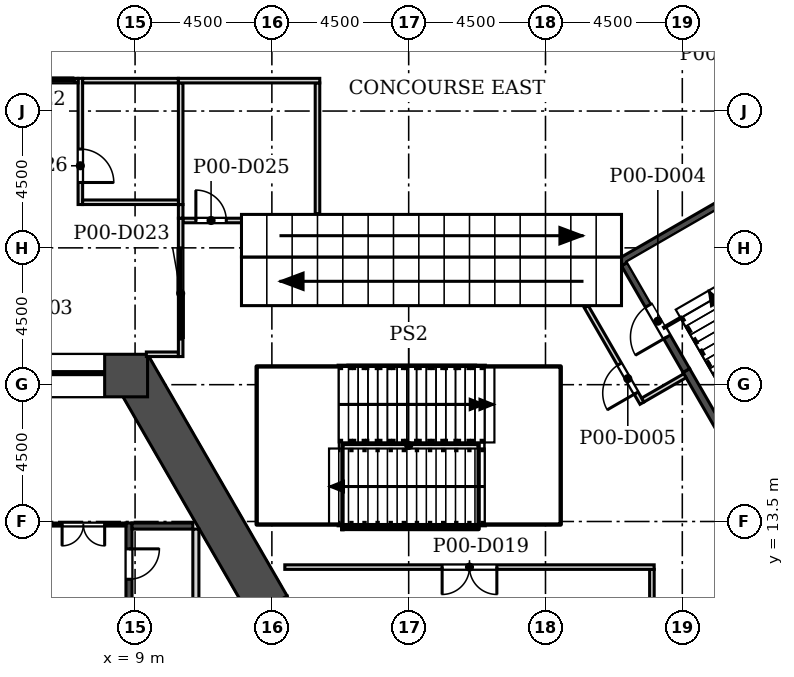
"""IFC4 building model, lengths in metres.
Left out: names, types, materials, properties, quantities, classifications, styles, units other than length and angle.
Written with IfcOpenShell. Run it as: python <this file> out.ifc"""

import sys

from ifc_helpers import new_model, si_unit, direction, frame, frame_2d, origin, place, context, subcontext, project, spatial, rectangle, extrude, element, fill, save


model = new_model("IFC4")
c1 = context("Model", 3, precision=1e-05, world=origin(), true_north=direction((0.0, 1.0)))
c2 = subcontext(c1, "Body", "Model", "MODEL_VIEW")
j1 = project(units=[si_unit("LENGTHUNIT", "METRE"), si_unit("PLANEANGLEUNIT", "RADIAN")], contexts=[c1])
p1 = place(None, origin())
s1 = spatial("IfcSite", under=j1, at=p1, CompositionType="ELEMENT")
p2 = place(p1, origin())
s2 = spatial("IfcBuilding", under=s1, at=p2, CompositionType="ELEMENT")
p3 = place(p2, origin())
s3 = spatial("IfcBuildingStorey", under=s2, at=p3, CompositionType="ELEMENT", Elevation=0.0)
p4 = place(p3, frame((13.3, 0.85, 0.0), z_axis=(0.0, 0.0, 1.0), x_axis=(0.0, 1.0, 0.0)))
e1 = element("IfcWall", 1, at=p4, inside=s3, PredefinedType="SHEAR", context=c2, shape_type="SweptSolid", body=[
    extrude(rectangle(XDim=10.202, YDim=1.4, at=frame_2d((5.101, 0.0))), origin(), (0.0, 0.0, 1.0), 8.0),
])
p5 = place(p4, frame((3.55, 0.0, 0.0)))
e2 = element("IfcOpeningElement", 2, at=p5, cuts=e1, PredefinedType="OPENING", context=c2, shape_type="SweptSolid", body=[
    extrude(rectangle(XDim=1.2, YDim=2.1, at=frame_2d((0.6, 1.05))), frame((0.0, 0.71, 0.0), z_axis=(0.0, -1.0, 0.0), x_axis=(1.0, 0.0, 0.0)), (0.0, 0.0, 1.0), 1.42),
])
p6 = place(p4, frame((7.55, 0.0, 0.0)))
e3 = element("IfcOpeningElement", 3, at=p6, cuts=e1, PredefinedType="OPENING", context=c2, shape_type="SweptSolid", body=[
    extrude(rectangle(XDim=1.2, YDim=2.1, at=frame_2d((0.6, 1.05))), frame((0.0, 0.71, 0.0), z_axis=(0.0, -1.0, 0.0), x_axis=(1.0, 0.0, 0.0)), (0.0, 0.0, 1.0), 1.42),
])
p7 = place(p3, frame((13.394, 10.703, 0.0), z_axis=(0.0, 0.0, 1.0), x_axis=(-0.50000187635, 0.866024320471, 0.0)))
e4 = element("IfcWall", 4, at=p7, inside=s3, PredefinedType="SHEAR", context=c2, shape_type="SweptSolid", body=[
    extrude(rectangle(XDim=9.177, YDim=1.4, at=frame_2d((4.588, 0.0))), origin(), (0.0, 0.0, 1.0), 8.0),
])
p8 = place(p3, frame((9.412, 18.3, 0.0), z_axis=(0.0, 0.0, 1.0), x_axis=(-1.0, 0.0, 0.0)))
e5 = element("IfcWall", 5, at=p8, inside=s3, PredefinedType="SHEAR", context=c2, shape_type="SweptSolid", body=[
    extrude(rectangle(XDim=18.823, YDim=1.4, at=frame_2d((9.412, 0.0))), origin(), (0.0, 0.0, 1.0), 8.0),
])
p9 = place(p8, frame((8.711, 0.0, 0.0)))
e6 = element("IfcOpeningElement", 6, at=p9, cuts=e5, PredefinedType="OPENING", context=c2, shape_type="SweptSolid", body=[
    extrude(rectangle(XDim=1.4, YDim=2.1, at=frame_2d((0.7, 1.05))), frame((0.0, 0.71, 0.0), z_axis=(0.0, -1.0, 0.0), x_axis=(1.0, 0.0, 0.0)), (0.0, 0.0, 1.0), 1.42),
])
p10 = place(p8, frame((11.412, 0.0, 0.0)))
e7 = element("IfcOpeningElement", 7, at=p10, cuts=e5, PredefinedType="OPENING", context=c2, shape_type="SweptSolid", body=[
    extrude(rectangle(XDim=6.0, YDim=2.4, at=frame_2d((3.0, 1.2))), frame((0.0, 0.71, 0.0), z_axis=(0.0, -1.0, 0.0), x_axis=(1.0, 0.0, 0.0)), (0.0, 0.0, 1.0), 1.42),
])
p11 = place(p8, frame((1.412, 0.0, 0.0)))
e8 = element("IfcOpeningElement", 8, at=p11, cuts=e5, PredefinedType="OPENING", context=c2, shape_type="SweptSolid", body=[
    extrude(rectangle(XDim=6.0, YDim=2.4, at=frame_2d((3.0, 1.2))), frame((0.0, 0.71, 0.0), z_axis=(0.0, -1.0, 0.0), x_axis=(1.0, 0.0, 0.0)), (0.0, 0.0, 1.0), 1.42),
])
p12 = place(p3, frame((33.882, 24.114, 0.0), z_axis=(0.0, 0.0, 1.0), x_axis=(-0.500002868947, 0.866023747391, 0.0)))
e9 = element("IfcWall", 9, at=p12, inside=s3, PredefinedType="SOLIDWALL", context=c2, shape_type="SweptSolid", body=[
    extrude(rectangle(XDim=34.115, YDim=0.34, at=frame_2d((17.058, 0.0))), origin(), (0.0, 0.0, 1.0), 7.7),
])
p13 = place(p12, frame((1.115, 0.0, 0.9)))
e10 = element("IfcOpeningElement", 10, at=p13, cuts=e9, PredefinedType="OPENING", context=c2, shape_type="SweptSolid", body=[
    extrude(rectangle(XDim=1.885, YDim=3.5, at=frame_2d((0.942, 1.75))), frame((0.0, 0.18, 0.0), z_axis=(0.0, -1.0, 0.0), x_axis=(1.0, 0.0, 0.0)), (0.0, 0.0, 1.0), 0.36),
])
p14 = place(p12, frame((4.115, 0.0, 0.9)))
e11 = element("IfcOpeningElement", 11, at=p14, cuts=e9, PredefinedType="OPENING", context=c2, shape_type="SweptSolid", body=[
    extrude(rectangle(XDim=1.885, YDim=3.5, at=frame_2d((0.942, 1.75))), frame((0.0, 0.18, 0.0), z_axis=(0.0, -1.0, 0.0), x_axis=(1.0, 0.0, 0.0)), (0.0, 0.0, 1.0), 0.36),
])
p15 = place(p12, frame((22.115, 0.0, 0.9)))
e12 = element("IfcOpeningElement", 12, at=p15, cuts=e9, PredefinedType="OPENING", context=c2, shape_type="SweptSolid", body=[
    extrude(rectangle(XDim=1.885, YDim=3.5, at=frame_2d((0.942, 1.75))), frame((0.0, 0.18, 0.0), z_axis=(0.0, -1.0, 0.0), x_axis=(1.0, 0.0, 0.0)), (0.0, 0.0, 1.0), 0.36),
])
p16 = place(p12, frame((25.115, 0.0, 0.9)))
e13 = element("IfcOpeningElement", 13, at=p16, cuts=e9, PredefinedType="OPENING", context=c2, shape_type="SweptSolid", body=[
    extrude(rectangle(XDim=1.885, YDim=3.5, at=frame_2d((0.942, 1.75))), frame((0.0, 0.18, 0.0), z_axis=(0.0, -1.0, 0.0), x_axis=(1.0, 0.0, 0.0)), (0.0, 0.0, 1.0), 0.36),
])
p17 = place(p12, frame((7.378, 0.0, 0.0)))
e14 = element("IfcOpeningElement", 14, at=p17, cuts=e9, PredefinedType="OPENING", context=c2, shape_type="SweptSolid", body=[
    extrude(rectangle(XDim=2.4, YDim=2.7, at=frame_2d((1.2, 1.35))), frame((0.0, 0.18, 0.0), z_axis=(0.0, -1.0, 0.0), x_axis=(1.0, 0.0, 0.0)), (0.0, 0.0, 1.0), 0.36),
])
p18 = place(p12, frame((18.857, 0.0, 0.0)))
e15 = element("IfcOpeningElement", 15, at=p18, cuts=e9, PredefinedType="OPENING", context=c2, shape_type="SweptSolid", body=[
    extrude(rectangle(XDim=2.4, YDim=2.7, at=frame_2d((1.2, 1.35))), frame((0.0, 0.18, 0.0), z_axis=(0.0, -1.0, 0.0), x_axis=(1.0, 0.0, 0.0)), (0.0, 0.0, 1.0), 0.36),
])
p19 = place(p12, frame((30.336, 0.0, 0.0)))
e16 = element("IfcOpeningElement", 16, at=p19, cuts=e9, PredefinedType="OPENING", context=c2, shape_type="SweptSolid", body=[
    extrude(rectangle(XDim=2.4, YDim=2.7, at=frame_2d((1.2, 1.35))), frame((0.0, 0.18, 0.0), z_axis=(0.0, -1.0, 0.0), x_axis=(1.0, 0.0, 0.0)), (0.0, 0.0, 1.0), 0.36),
])
p20 = place(p12, frame((12.215, 0.0, 0.0)))
e17 = element("IfcOpeningElement", 17, at=p20, cuts=e9, PredefinedType="OPENING", context=c2, shape_type="SweptSolid", body=[
    extrude(rectangle(XDim=4.885, YDim=4.5, at=frame_2d((2.442, 2.25))), frame((0.0, 0.18, 0.0), z_axis=(0.0, -1.0, 0.0), x_axis=(1.0, 0.0, 0.0)), (0.0, 0.0, 1.0), 0.36),
])
p21 = place(p3, frame((11.0, 5.85, 0.0), z_axis=(0.0, 0.0, 1.0), x_axis=(0.0, 1.0, 0.0)))
e18 = element("IfcWall", 18, at=p21, inside=s3, PredefinedType="SOLIDWALL", context=c2, shape_type="SweptSolid", body=[
    extrude(rectangle(XDim=7.4, YDim=0.2, at=frame_2d((3.7, 0.0))), origin(), (0.0, 0.0, 1.0), 7.7),
])
p22 = place(p3, frame((8.8, 8.25, -0.4), z_axis=(0.0, 0.0, 1.0), x_axis=(0.0, 1.0, 0.0)))
e19 = element("IfcWall", 19, at=p22, inside=s3, PredefinedType="SOLIDWALL", context=c2, shape_type="SweptSolid", body=[
    extrude(rectangle(XDim=5.2, YDim=0.2, at=frame_2d((2.6, 0.0))), origin(), (0.0, 0.0, 1.0), 8.1),
])
p23 = place(p22, frame((0.85, 0.0, 0.4)))
e20 = element("IfcOpeningElement", 20, at=p23, cuts=e19, PredefinedType="OPENING", context=c2, shape_type="SweptSolid", body=[
    extrude(rectangle(XDim=1.0, YDim=2.1, at=frame_2d((0.5, 1.05))), frame((0.0, 0.11, 0.0), z_axis=(0.0, -1.0, 0.0), x_axis=(1.0, 0.0, 0.0)), (0.0, 0.0, 1.0), 0.22),
])
p24 = place(p22, frame((3.35, 0.0, 0.4)))
e21 = element("IfcOpeningElement", 21, at=p24, cuts=e19, PredefinedType="OPENING", context=c2, shape_type="SweptSolid", body=[
    extrude(rectangle(XDim=1.0, YDim=2.1, at=frame_2d((0.5, 1.05))), frame((0.0, 0.11, 0.0), z_axis=(0.0, -1.0, 0.0), x_axis=(1.0, 0.0, 0.0)), (0.0, 0.0, 1.0), 0.22),
])
p25 = place(p3, frame((8.9, 13.35, -0.4), z_axis=(0.0, 0.0, 1.0), x_axis=(1.0, 0.0, 0.0)))
e22 = element("IfcWall", 22, at=p25, inside=s3, PredefinedType="SOLIDWALL", context=c2, shape_type="SweptSolid", body=[
    extrude(rectangle(XDim=2.0, YDim=0.2, at=frame_2d((1.0, 0.0))), origin(), (0.0, 0.0, 1.0), 8.1),
])
p26 = place(p3, frame((5.9, 13.4, 0.0), z_axis=(0.0, 0.0, 1.0), x_axis=(1.0, 0.0, 0.0)))
e23 = element("IfcWall", 23, at=p26, inside=s3, PredefinedType="PARTITIONING", context=c2, shape_type="SweptSolid", body=[
    extrude(rectangle(XDim=2.8, YDim=0.1, at=frame_2d((1.4, 0.0))), origin(), (0.0, 0.0, 1.0), 7.7),
])
p27 = place(p26, frame((0.7, 0.0, 0.0)))
e24 = element("IfcOpeningElement", 24, at=p27, cuts=e23, PredefinedType="OPENING", context=c2, shape_type="SweptSolid", body=[
    extrude(rectangle(XDim=1.4, YDim=2.1, at=frame_2d((0.7, 1.05))), frame((0.0, 0.06, 0.0), z_axis=(0.0, -1.0, 0.0), x_axis=(1.0, 0.0, 0.0)), (0.0, 0.0, 1.0), 0.12),
])
p28 = place(p3, frame((26.0, 11.925, 0.0), z_axis=(0.0, 0.0, 1.0), x_axis=(0.0, -1.0, 0.0)))
e25 = element("IfcWall", 25, at=p28, inside=s3, PredefinedType="PARTITIONING", context=c2, shape_type="SweptSolid", body=[
    extrude(rectangle(XDim=1.85, YDim=0.15, at=frame_2d((0.925, 0.0))), origin(), (0.0, 0.0, 1.0), 7.7),
])
p29 = place(p3, frame((30.907, 11.927, 0.0), z_axis=(0.0, 0.0, 1.0), x_axis=(-0.499985572004, 0.866033733632, 0.0)))
e26 = element("IfcWall", 26, at=p29, inside=s3, PredefinedType="SOLIDWALL", context=c2, shape_type="SweptSolid", body=[
    extrude(rectangle(XDim=7.55, YDim=0.25, at=frame_2d((3.775, 0.0))), origin(), (0.0, 0.0, 1.0), 7.7),
])
p30 = place(p3, frame((13.925, 12.0, 0.0), z_axis=(0.0, 0.0, 1.0), x_axis=(1.0, 0.0, 0.0)))
e27 = element("IfcWall", 27, at=p30, inside=s3, PredefinedType="PARTITIONING", context=c2, shape_type="SweptSolid", body=[
    extrude(rectangle(XDim=12.15, YDim=0.15, at=frame_2d((6.075, 0.0))), origin(), (0.0, 0.0, 1.0), 7.7),
])
p31 = place(p30, frame((5.175, 0.0, 0.0)))
e28 = element("IfcOpeningElement", 28, at=p31, cuts=e27, PredefinedType="OPENING", context=c2, shape_type="SweptSolid", body=[
    extrude(rectangle(XDim=1.8, YDim=2.1, at=frame_2d((0.9, 1.05))), frame((0.0, 0.085, 0.0), z_axis=(0.0, -1.0, 0.0), x_axis=(1.0, 0.0, 0.0)), (0.0, 0.0, 1.0), 0.17),
])
p32 = place(p3, frame((25.673, 17.392, 0.0), z_axis=(0.0, 0.0, 1.0), x_axis=(-0.499958946799, 0.866049104564, 0.0)))
e29 = element("IfcWall", 29, at=p32, inside=s3, PredefinedType="PARTITIONING", context=c2, shape_type="SweptSolid", body=[
    extrude(rectangle(XDim=3.664, YDim=0.15, at=frame_2d((1.832, 0.0))), origin(), (0.0, 0.0, 1.0), 7.7),
])
p33 = place(p32, frame((0.382, 0.0, 0.0)))
e30 = element("IfcOpeningElement", 30, at=p33, cuts=e29, PredefinedType="OPENING", context=c2, shape_type="SweptSolid", body=[
    extrude(rectangle(XDim=1.1, YDim=2.1, at=frame_2d((0.55, 1.05))), frame((0.0, 0.085, 0.0), z_axis=(0.0, -1.0, 0.0), x_axis=(1.0, 0.0, 0.0)), (0.0, 0.0, 1.0), 0.17),
])
p34 = place(p3, frame((27.087, 18.294, 0.0), z_axis=(0.0, 0.0, 1.0), x_axis=(-0.866066190972, -0.499929347863, 0.0)))
e31 = element("IfcWall", 31, at=p34, inside=s3, PredefinedType="PARTITIONING", context=c2, shape_type="SweptSolid", body=[
    extrude(rectangle(XDim=1.6, YDim=0.15, at=frame_2d((0.8, 0.0))), origin(), (0.0, 0.0, 1.0), 7.7),
])
p35 = place(p3, frame((27.132, 18.465, 0.0), z_axis=(0.0, 0.0, 1.0), x_axis=(-0.499971214291, 0.866042022584, 0.0)))
e32 = element("IfcWall", 32, at=p35, inside=s3, PredefinedType="SOLIDWALL", context=c2, shape_type="SweptSolid", body=[
    extrude(rectangle(XDim=4.05, YDim=0.25, at=frame_2d((2.025, 0.0))), origin(), (0.0, 0.0, 1.0), 7.7),
])
p36 = place(p35, frame((1.275, 0.0, 0.0)))
e33 = element("IfcOpeningElement", 33, at=p36, cuts=e32, PredefinedType="OPENING", context=c2, shape_type="SweptSolid", body=[
    extrude(rectangle(XDim=1.2, YDim=2.1, at=frame_2d((0.6, 1.05))), frame((0.0, 0.135, 0.0), z_axis=(0.0, -1.0, 0.0), x_axis=(1.0, 0.0, 0.0)), (0.0, 0.0, 1.0), 0.27),
])
p37 = place(p3, frame((10.425, 19.0, 0.0), z_axis=(0.0, 0.0, 1.0), x_axis=(-1.0, 0.0, 0.0)))
e34 = element("IfcWall", 34, at=p37, inside=s3, PredefinedType="PARTITIONING", context=c2, shape_type="SweptSolid", body=[
    extrude(rectangle(XDim=1.054, YDim=0.15, at=frame_2d((0.527, 0.0))), origin(), (0.0, 0.0, 1.0), 7.7),
])
p38 = place(p3, frame((24.936, 22.018, 0.0), z_axis=(0.0, 0.0, 1.0), x_axis=(0.866040211805, 0.499974350878, 0.0)))
e35 = element("IfcWall", 35, at=p38, inside=s3, PredefinedType="SOLIDWALL", context=c2, shape_type="SweptSolid", body=[
    extrude(rectangle(XDim=6.6, YDim=0.25, at=frame_2d((3.3, 0.0))), origin(), (0.0, 0.0, 1.0), 7.7),
])
p39 = place(p3, frame((12.575, 23.4, 0.0), z_axis=(0.0, 0.0, 1.0), x_axis=(-1.0, 0.0, 0.0)))
e36 = element("IfcWall", 36, at=p39, inside=s3, PredefinedType="PARTITIONING", context=c2, shape_type="SweptSolid", body=[
    extrude(rectangle(XDim=2.0, YDim=0.15, at=frame_2d((1.0, 0.0))), origin(), (0.0, 0.0, 1.0), 7.7),
])
p40 = place(p39, frame((0.575, 0.0, 0.0)))
e37 = element("IfcOpeningElement", 37, at=p40, cuts=e36, PredefinedType="OPENING", context=c2, shape_type="SweptSolid", body=[
    extrude(rectangle(XDim=1.0, YDim=2.1, at=frame_2d((0.5, 1.05))), frame((0.0, 0.085, 0.0), z_axis=(0.0, -1.0, 0.0), x_axis=(1.0, 0.0, 0.0)), (0.0, 0.0, 1.0), 0.17),
])
p41 = place(p3, frame((10.5, 23.475, 0.0), z_axis=(0.0, 0.0, 1.0), x_axis=(0.0, -1.0, 0.0)))
e38 = element("IfcWall", 38, at=p41, inside=s3, PredefinedType="PARTITIONING", context=c2, shape_type="SweptSolid", body=[
    extrude(rectangle(XDim=4.55, YDim=0.15, at=frame_2d((2.275, 0.0))), origin(), (0.0, 0.0, 1.0), 7.7),
])
p42 = place(p41, frame((0.975, 0.0, 0.0)))
e39 = element("IfcOpeningElement", 39, at=p42, cuts=e38, PredefinedType="OPENING", context=c2, shape_type="SweptSolid", body=[
    extrude(rectangle(XDim=3.0, YDim=2.4, at=frame_2d((1.5, 1.2))), frame((0.0, 0.085, 0.0), z_axis=(0.0, -1.0, 0.0), x_axis=(1.0, 0.0, 0.0)), (0.0, 0.0, 1.0), 0.17),
])
p43 = place(p3, frame((10.5, 23.475, 0.0), z_axis=(0.0, 0.0, 1.0), x_axis=(0.0, 1.0, 0.0)))
e40 = element("IfcWall", 40, at=p43, inside=s3, PredefinedType="PARTITIONING", context=c2, shape_type="SweptSolid", body=[
    extrude(rectangle(XDim=0.45, YDim=0.15, at=frame_2d((0.225, 0.0))), origin(), (0.0, 0.0, 1.0), 7.7),
])
p44 = place(p3, frame((7.2, 23.925, 0.0), z_axis=(0.0, 0.0, 1.0), x_axis=(0.0, 1.0, 0.0)))
e41 = element("IfcWall", 41, at=p44, inside=s3, PredefinedType="PARTITIONING", context=c2, shape_type="SweptSolid", body=[
    extrude(rectangle(XDim=4.15, YDim=0.15, at=frame_2d((2.075, 0.0))), origin(), (0.0, 0.0, 1.0), 7.7),
])
p45 = place(p44, frame((0.725, 0.0, 0.0)))
e42 = element("IfcOpeningElement", 42, at=p45, cuts=e41, PredefinedType="OPENING", context=c2, shape_type="SweptSolid", body=[
    extrude(rectangle(XDim=1.1, YDim=2.1, at=frame_2d((0.55, 1.05))), frame((0.0, 0.085, 0.0), z_axis=(0.0, -1.0, 0.0), x_axis=(1.0, 0.0, 0.0)), (0.0, 0.0, 1.0), 0.17),
])
p46 = place(p3, frame((10.5, 23.925, 0.0), z_axis=(0.0, 0.0, 1.0), x_axis=(0.0, 1.0, 0.0)))
e43 = element("IfcWall", 43, at=p46, inside=s3, PredefinedType="PARTITIONING", context=c2, shape_type="SweptSolid", body=[
    extrude(rectangle(XDim=4.0, YDim=0.15, at=frame_2d((2.0, 0.0))), origin(), (0.0, 0.0, 1.0), 7.7),
])
p47 = place(p3, frame((10.425, 24.0, 0.0), z_axis=(0.0, 0.0, 1.0), x_axis=(-1.0, 0.0, 0.0)))
e44 = element("IfcWall", 44, at=p47, inside=s3, PredefinedType="PARTITIONING", context=c2, shape_type="SweptSolid", body=[
    extrude(rectangle(XDim=3.15, YDim=0.15, at=frame_2d((1.575, 0.0))), origin(), (0.0, 0.0, 1.0), 7.7),
])
p48 = place(p3, frame((15.0, 27.925, 0.0), z_axis=(0.0, 0.0, 1.0), x_axis=(0.0, -1.0, 0.0)))
e45 = element("IfcWall", 45, at=p48, inside=s3, PredefinedType="PARTITIONING", context=c2, shape_type="SweptSolid", body=[
    extrude(rectangle(XDim=4.3, YDim=0.15, at=frame_2d((2.15, 0.0))), origin(), (0.0, 0.0, 1.0), 7.7),
])
p49 = place(p3, frame((3.925, 28.0, 0.0), z_axis=(0.0, 0.0, 1.0), x_axis=(1.0, 0.0, 0.0)))
e46 = element("IfcWall", 46, at=p49, inside=s3, PredefinedType="PARTITIONING", context=c2, shape_type="SweptSolid", body=[
    extrude(rectangle(XDim=3.2, YDim=0.15, at=frame_2d((1.6, 0.0))), origin(), (0.0, 0.0, 1.0), 7.7),
])
p50 = place(p49, frame((0.08, 0.0, 0.0)))
e47 = element("IfcOpeningElement", 47, at=p50, cuts=e46, PredefinedType="OPENING", context=c2, shape_type="SweptSolid", body=[
    extrude(rectangle(XDim=3.0, YDim=2.4, at=frame_2d((1.5, 1.2))), frame((0.0, 0.085, 0.0), z_axis=(0.0, -1.0, 0.0), x_axis=(1.0, 0.0, 0.0)), (0.0, 0.0, 1.0), 0.17),
])
p51 = place(p3, frame((7.275, 28.0, 0.0), z_axis=(0.0, 0.0, 1.0), x_axis=(1.0, 0.0, 0.0)))
e48 = element("IfcWall", 48, at=p51, inside=s3, PredefinedType="PARTITIONING", context=c2, shape_type="SweptSolid", body=[
    extrude(rectangle(XDim=3.15, YDim=0.15, at=frame_2d((1.575, 0.0))), origin(), (0.0, 0.0, 1.0), 7.7),
])
p52 = place(p3, frame((10.425, 28.0, 0.0), z_axis=(0.0, 0.0, 1.0), x_axis=(1.0, 0.0, 0.0)))
e49 = element("IfcWall", 49, at=p52, inside=s3, PredefinedType="PARTITIONING", context=c2, shape_type="SweptSolid", body=[
    extrude(rectangle(XDim=4.65, YDim=0.15, at=frame_2d((2.325, 0.0))), origin(), (0.0, 0.0, 1.0), 7.7),
])
p53 = place(p3, frame((22.875, 13.45, 0.0), z_axis=(0.0, 0.0, 1.0), x_axis=(0.0, 1.0, 0.0)))
e50 = element("IfcWall", 50, at=p53, inside=s3, PredefinedType="SOLIDWALL", context=c2, shape_type="SweptSolid", body=[
    extrude(rectangle(XDim=5.1, YDim=0.25, at=frame_2d((2.55, 0.0))), origin(), (0.0, 0.0, 1.0), 2.409),
])
for number, where, z_axis, x_axis in (
    (51, (22.875, 13.525, 0.0), (0.0, 0.0, 1.0), (-1.0, 0.0, 0.0)),
    (52, (22.875, 18.475, 0.0), (0.0, 0.0, 1.0), (-1.0, 0.0, 0.0)),
):
    element("IfcWall", number, at=place(p3, frame(where, z_axis=z_axis, x_axis=x_axis)), inside=s3, PredefinedType="SOLIDWALL", context=c2, shape_type="SweptSolid", body=[
        extrude(rectangle(XDim=2.25, YDim=0.25, at=frame_2d((1.125, 0.0))), origin(), (0.0, 0.0, 1.0), 2.409),
    ])
p54 = place(p3, frame((13.125, 13.45, 0.0), z_axis=(0.0, 0.0, 1.0), x_axis=(0.0, 1.0, 0.0)))
e53 = element("IfcWall", 53, at=p54, inside=s3, PredefinedType="SOLIDWALL", context=c2, shape_type="SweptSolid", body=[
    extrude(rectangle(XDim=5.1, YDim=0.25, at=frame_2d((2.55, 0.0))), origin(), (0.0, 0.0, 1.0), 7.7),
])
for number, where, z_axis, x_axis in (
    (54, (13.125, 13.525, 0.0), (0.0, 0.0, 1.0), (1.0, 0.0, 0.0)),
    (55, (13.125, 18.475, 0.0), (0.0, 0.0, 1.0), (1.0, 0.0, 0.0)),
):
    element("IfcWall", number, at=place(p3, frame(where, z_axis=z_axis, x_axis=x_axis)), inside=s3, PredefinedType="SOLIDWALL", context=c2, shape_type="SweptSolid", body=[
        extrude(rectangle(XDim=2.45, YDim=0.25, at=frame_2d((1.225, 0.0))), origin(), (0.0, 0.0, 1.0), 7.7),
    ])
p55 = place(p24, frame((1.0, 0.0, 0.0), z_axis=(0.0, 0.0, 1.0), x_axis=(-1.0, 0.0, 0.0)))
e56 = element("IfcDoor", 56, at=p55, inside=s3, OperationType="SINGLE_SWING_LEFT", PredefinedType="DOOR", context=c2, shape_type="SweptSolid", body=[
    extrude(rectangle(XDim=1.0, YDim=2.1, at=frame_2d((0.5, 1.05))), frame((0.0, 0.025, 0.0), z_axis=(0.0, -1.0, 0.0), x_axis=(1.0, 0.0, 0.0)), (0.0, 0.0, 1.0), 0.05),
])
fill(e21, e56)
p56 = place(p27, frame((1.4, 0.0, 0.0), z_axis=(0.0, 0.0, 1.0), x_axis=(-1.0, 0.0, 0.0)))
e57 = element("IfcDoor", 57, at=p56, inside=s3, OperationType="DOUBLE_DOOR_SINGLE_SWING", PredefinedType="DOOR", context=c2, shape_type="SweptSolid", body=[
    extrude(rectangle(XDim=1.4, YDim=2.1, at=frame_2d((0.7, 1.05))), frame((0.0, 0.025, 0.0), z_axis=(0.0, -1.0, 0.0), x_axis=(1.0, 0.0, 0.0)), (0.0, 0.0, 1.0), 0.05),
])
fill(e24, e57)
p57 = place(p11, origin())
e58 = element("IfcDoor", 58, at=p57, inside=s3, OperationType="DOUBLE_DOOR_SLIDING", PredefinedType="DOOR", context=c2, shape_type="SweptSolid", body=[
    extrude(rectangle(XDim=6.0, YDim=2.4, at=frame_2d((3.0, 1.2))), frame((0.0, 0.025, 0.0), z_axis=(0.0, -1.0, 0.0), x_axis=(1.0, 0.0, 0.0)), (0.0, 0.0, 1.0), 0.05),
])
fill(e8, e58)
p58 = place(p36, origin())
e59 = element("IfcDoor", 59, at=p58, inside=s3, OperationType="SINGLE_SWING_LEFT", PredefinedType="DOOR", context=c2, shape_type="SweptSolid", body=[
    extrude(rectangle(XDim=1.2, YDim=2.1, at=frame_2d((0.6, 1.05))), frame((0.0, 0.025, 0.0), z_axis=(0.0, -1.0, 0.0), x_axis=(1.0, 0.0, 0.0)), (0.0, 0.0, 1.0), 0.05),
])
fill(e33, e59)
p59 = place(p33, origin())
e60 = element("IfcDoor", 60, at=p59, inside=s3, OperationType="SINGLE_SWING_LEFT", PredefinedType="DOOR", context=c2, shape_type="SweptSolid", body=[
    extrude(rectangle(XDim=1.1, YDim=2.1, at=frame_2d((0.55, 1.05))), frame((0.0, 0.025, 0.0), z_axis=(0.0, -1.0, 0.0), x_axis=(1.0, 0.0, 0.0)), (0.0, 0.0, 1.0), 0.05),
])
fill(e30, e60)
p60 = place(p31, frame((1.8, 0.0, 0.0), z_axis=(0.0, 0.0, 1.0), x_axis=(-1.0, 0.0, 0.0)))
e61 = element("IfcDoor", 61, at=p60, inside=s3, OperationType="DOUBLE_DOOR_SINGLE_SWING", PredefinedType="DOOR", context=c2, shape_type="SweptSolid", body=[
    extrude(rectangle(XDim=1.8, YDim=2.1, at=frame_2d((0.9, 1.05))), frame((0.0, 0.025, 0.0), z_axis=(0.0, -1.0, 0.0), x_axis=(1.0, 0.0, 0.0)), (0.0, 0.0, 1.0), 0.05),
])
fill(e28, e61)
p61 = place(p50, origin())
e62 = element("IfcDoor", 62, at=p61, inside=s3, OperationType="DOUBLE_DOOR_SLIDING", PredefinedType="DOOR", context=c2, shape_type="SweptSolid", body=[
    extrude(rectangle(XDim=3.0, YDim=2.4, at=frame_2d((1.5, 1.2))), frame((0.0, 0.025, 0.0), z_axis=(0.0, -1.0, 0.0), x_axis=(1.0, 0.0, 0.0)), (0.0, 0.0, 1.0), 0.05),
])
fill(e47, e62)
p62 = place(p42, origin())
e63 = element("IfcDoor", 63, at=p62, inside=s3, OperationType="DOUBLE_DOOR_SLIDING", PredefinedType="DOOR", context=c2, shape_type="SweptSolid", body=[
    extrude(rectangle(XDim=3.0, YDim=2.4, at=frame_2d((1.5, 1.2))), frame((0.0, 0.025, 0.0), z_axis=(0.0, -1.0, 0.0), x_axis=(1.0, 0.0, 0.0)), (0.0, 0.0, 1.0), 0.05),
])
fill(e39, e63)
p63 = place(p40, frame((1.0, 0.0, 0.0), z_axis=(0.0, 0.0, 1.0), x_axis=(-1.0, 0.0, 0.0)))
e64 = element("IfcDoor", 64, at=p63, inside=s3, OperationType="SINGLE_SWING_LEFT", PredefinedType="DOOR", context=c2, shape_type="SweptSolid", body=[
    extrude(rectangle(XDim=1.0, YDim=2.1, at=frame_2d((0.5, 1.05))), frame((0.0, 0.025, 0.0), z_axis=(0.0, -1.0, 0.0), x_axis=(1.0, 0.0, 0.0)), (0.0, 0.0, 1.0), 0.05),
])
fill(e37, e64)
p64 = place(p45, frame((1.1, 0.0, 0.0), z_axis=(0.0, 0.0, 1.0), x_axis=(-1.0, 0.0, 0.0)))
e65 = element("IfcDoor", 65, at=p64, inside=s3, OperationType="SINGLE_SWING_RIGHT", PredefinedType="DOOR", context=c2, shape_type="SweptSolid", body=[
    extrude(rectangle(XDim=1.1, YDim=2.1, at=frame_2d((0.55, 1.05))), frame((0.0, 0.025, 0.0), z_axis=(0.0, -1.0, 0.0), x_axis=(1.0, 0.0, 0.0)), (0.0, 0.0, 1.0), 0.05),
])
fill(e42, e65)
save(model, sys.argv[1])
